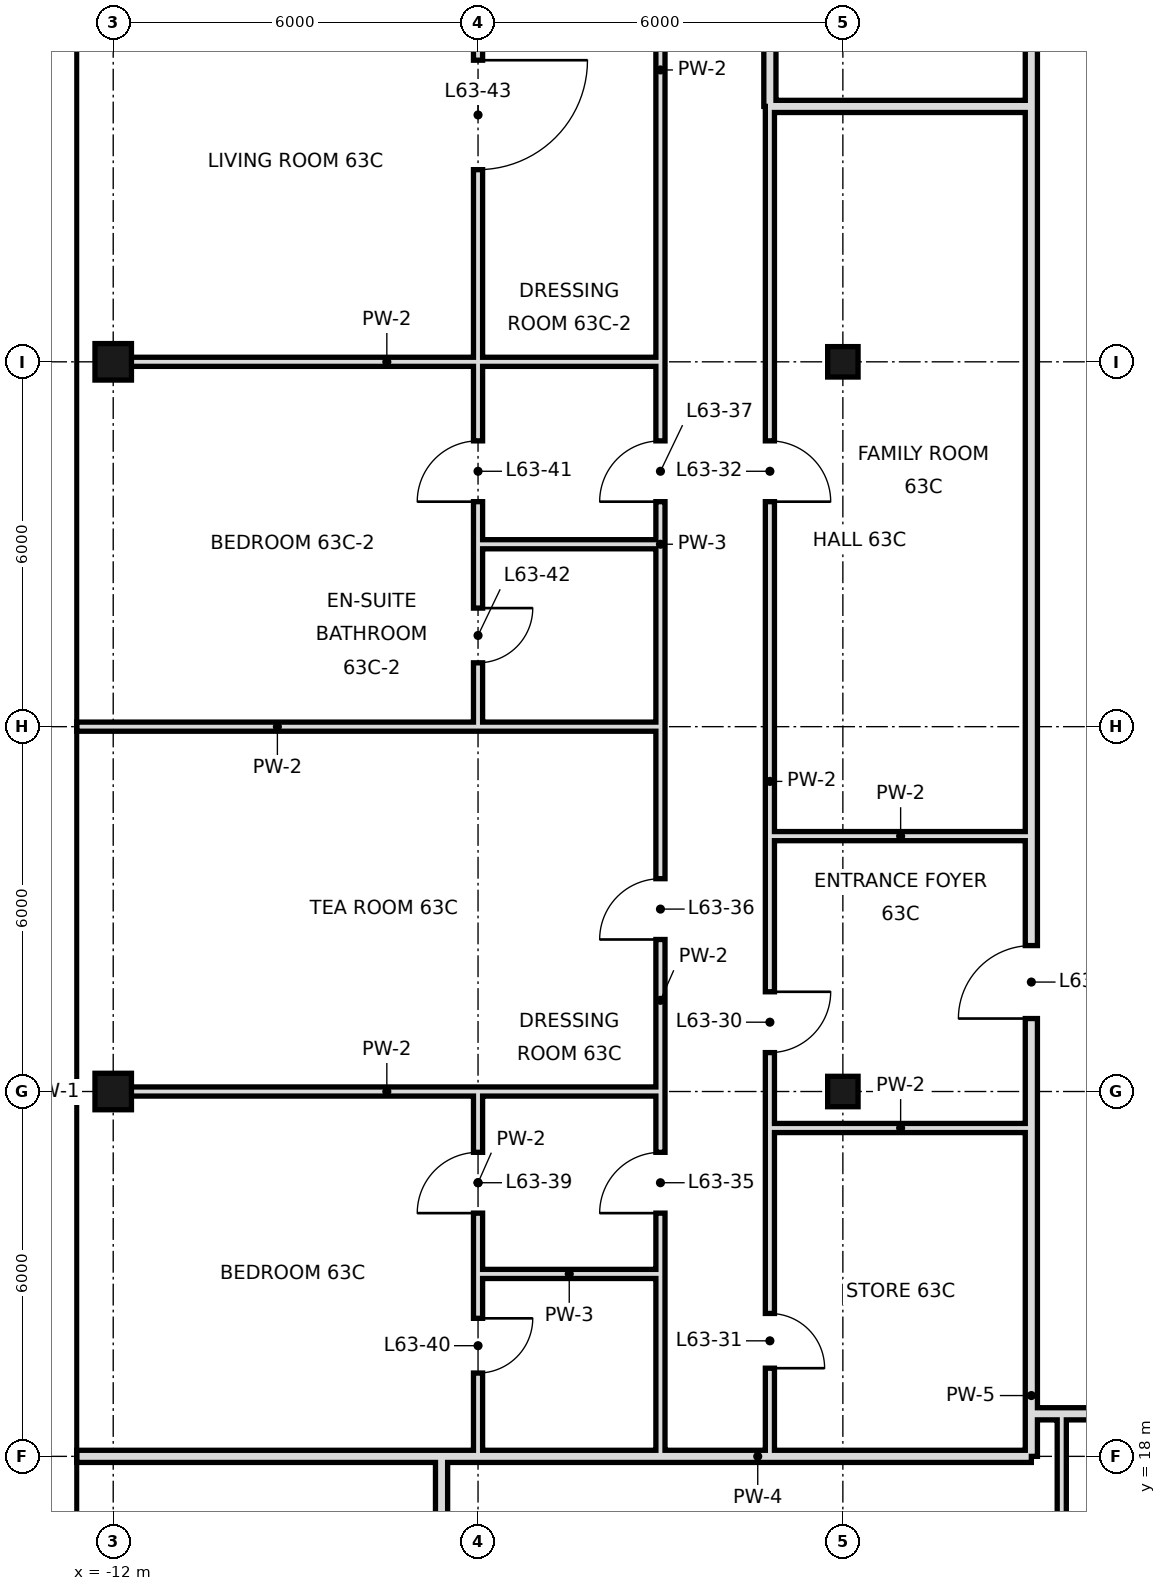
"""IFC4 building model, lengths in metres.
Left out: names, types, materials, properties, quantities, classifications, styles, units other than length and angle.
Written with IfcOpenShell. Run it as: python <this file> out.ifc"""

import sys

from ifc_helpers import new_model, si_unit, direction, frame, frame_2d, origin, origin_2d, place, context, subcontext, project, spatial, rectangle, hollow_rectangle, extrude, element, fill, save


model = new_model("IFC4")
c1 = context("Model", 3, precision=1e-05, world=origin(), true_north=direction((0.0, 1.0)))
c2 = subcontext(c1, "Body", "Model", "MODEL_VIEW")
j1 = project(units=[si_unit("LENGTHUNIT", "METRE"), si_unit("PLANEANGLEUNIT", "RADIAN")], contexts=[c1])
p1 = place(None, origin())
s1 = spatial("IfcSite", under=j1, at=p1, CompositionType="ELEMENT")
p2 = place(p1, origin())
s2 = spatial("IfcBuilding", under=s1, at=p2, CompositionType="ELEMENT")
p3 = place(p2, frame((0.0, 0.0, 266.6)))
s3 = spatial("IfcBuildingStorey", under=s2, at=p3, CompositionType="ELEMENT", Elevation=266.6)
for number, where, z_axis, x_axis in (
    (1, (-12.0, 24.0, 0.0), (0.0, 0.0, 1.0), (1.0, 0.0, 0.0)),
    (2, (-12.0, 36.0, 0.0), (0.0, 0.0, 1.0), (1.0, 0.0, 0.0)),
):
    element("IfcColumn", number, at=place(p3, frame(where, z_axis=z_axis, x_axis=x_axis)), inside=s3, PredefinedType="COLUMN", context=c2, shape_type="SweptSolid", body=[
        extrude(hollow_rectangle(XDim=0.6, YDim=0.6, WallThickness=0.028, at=origin_2d()), origin(), (0.0, 0.0, 1.0), 3.6),
    ])
for number, where, z_axis, x_axis in (
    (3, (0.0, 24.0, 0.0), (0.0, 0.0, 1.0), (1.0, 0.0, 0.0)),
    (4, (0.0, 36.0, 0.0), (0.0, 0.0, 1.0), (1.0, 0.0, 0.0)),
):
    element("IfcColumn", number, at=place(p3, frame(where, z_axis=z_axis, x_axis=x_axis)), inside=s3, PredefinedType="COLUMN", context=c2, shape_type="SweptSolid", body=[
        extrude(hollow_rectangle(XDim=0.5, YDim=0.5, WallThickness=0.025, at=origin_2d()), origin(), (0.0, 0.0, 1.0), 3.6),
    ])
p4 = place(p3, frame((-1.2, 40.2, 0.0), z_axis=(0.0, 0.0, 1.0), x_axis=(0.0, 1.0, 0.0)))
e5 = element("IfcWall", 5, at=p4, inside=s3, PredefinedType="SOLIDWALL", context=c2, shape_type="SweptSolid", body=[
    extrude(rectangle(XDim=5.4, YDim=0.2, at=frame_2d((2.7, 0.0))), origin(), (0.0, 0.0, 1.0), 2.72),
])
p5 = place(p4, frame((1.42, 0.0, 0.0)))
e6 = element("IfcOpeningElement", 6, at=p5, cuts=e5, PredefinedType="OPENING", context=c2, shape_type="SweptSolid", body=[
    extrude(rectangle(XDim=1.0, YDim=2.4, at=frame_2d((0.5, 1.2))), frame((0.0, 0.11, 0.0), z_axis=(0.0, -1.0, 0.0), x_axis=(1.0, 0.0, 0.0)), (0.0, 0.0, 1.0), 0.22),
])
p6 = place(p3, frame((-1.2, 18.0, 0.0), z_axis=(0.0, 0.0, 1.0), x_axis=(0.0, 1.0, 0.0)))
e7 = element("IfcWall", 7, at=p6, inside=s3, PredefinedType="PARTITIONING", context=c2, shape_type="SweptSolid", body=[
    extrude(rectangle(XDim=22.2, YDim=0.15, at=frame_2d((11.1, 0.0))), origin(), (0.0, 0.0, 1.0), 3.42),
])
p7 = place(p6, frame((6.64, 0.0, 0.0)))
e8 = element("IfcOpeningElement", 8, at=p7, cuts=e7, PredefinedType="OPENING", context=c2, shape_type="SweptSolid", body=[
    extrude(rectangle(XDim=1.0, YDim=2.4, at=frame_2d((0.5, 1.2))), frame((0.0, 0.085, 0.0), z_axis=(0.0, -1.0, 0.0), x_axis=(1.0, 0.0, 0.0)), (0.0, 0.0, 1.0), 0.17),
])
p8 = place(p6, frame((1.45, 0.0, 0.0)))
e9 = element("IfcOpeningElement", 9, at=p8, cuts=e7, PredefinedType="OPENING", context=c2, shape_type="SweptSolid", body=[
    extrude(rectangle(XDim=0.9, YDim=2.1, at=frame_2d((0.45, 1.05))), frame((0.0, 0.085, 0.0), z_axis=(0.0, -1.0, 0.0), x_axis=(1.0, 0.0, 0.0)), (0.0, 0.0, 1.0), 0.17),
])
p9 = place(p6, frame((15.7, 0.0, 0.0)))
e10 = element("IfcOpeningElement", 10, at=p9, cuts=e7, PredefinedType="OPENING", context=c2, shape_type="SweptSolid", body=[
    extrude(rectangle(XDim=1.0, YDim=2.4, at=frame_2d((0.5, 1.2))), frame((0.0, 0.085, 0.0), z_axis=(0.0, -1.0, 0.0), x_axis=(1.0, 0.0, 0.0)), (0.0, 0.0, 1.0), 0.17),
])
p10 = place(p3, frame((-3.0, 21.0, 0.0), z_axis=(0.0, 0.0, 1.0), x_axis=(0.0, 1.0, 0.0)))
e11 = element("IfcWall", 11, at=p10, inside=s3, PredefinedType="PARTITIONING", context=c2, shape_type="SweptSolid", body=[
    extrude(rectangle(XDim=9.0, YDim=0.15, at=frame_2d((4.5, 0.0))), origin(), (0.0, 0.0, 1.0), 3.42),
])
p11 = place(p10, frame((1.0, 0.0, 0.0)))
e12 = element("IfcOpeningElement", 12, at=p11, cuts=e11, PredefinedType="OPENING", context=c2, shape_type="SweptSolid", body=[
    extrude(rectangle(XDim=1.0, YDim=2.4, at=frame_2d((0.5, 1.2))), frame((0.0, 0.085, 0.0), z_axis=(0.0, -1.0, 0.0), x_axis=(1.0, 0.0, 0.0)), (0.0, 0.0, 1.0), 0.17),
])
p12 = place(p10, frame((5.5, 0.0, 0.0)))
e13 = element("IfcOpeningElement", 13, at=p12, cuts=e11, PredefinedType="OPENING", context=c2, shape_type="SweptSolid", body=[
    extrude(rectangle(XDim=1.0, YDim=2.4, at=frame_2d((0.5, 1.2))), frame((0.0, 0.085, 0.0), z_axis=(0.0, -1.0, 0.0), x_axis=(1.0, 0.0, 0.0)), (0.0, 0.0, 1.0), 0.17),
])
p13 = place(p3, frame((-3.0, 33.0, 0.0), z_axis=(0.0, 0.0, 1.0), x_axis=(0.0, 1.0, 0.0)))
e14 = element("IfcWall", 14, at=p13, inside=s3, PredefinedType="PARTITIONING", context=c2, shape_type="SweptSolid", body=[
    extrude(rectangle(XDim=15.6, YDim=0.15, at=frame_2d((7.8, 0.0))), origin(), (0.0, 0.0, 1.0), 3.42),
])
p14 = place(p13, frame((0.7, 0.0, 0.0)))
e15 = element("IfcOpeningElement", 15, at=p14, cuts=e14, PredefinedType="OPENING", context=c2, shape_type="SweptSolid", body=[
    extrude(rectangle(XDim=1.0, YDim=2.4, at=frame_2d((0.5, 1.2))), frame((0.0, 0.085, 0.0), z_axis=(0.0, -1.0, 0.0), x_axis=(1.0, 0.0, 0.0)), (0.0, 0.0, 1.0), 0.17),
])
p15 = place(p13, frame((10.04, 0.0, 0.0)))
e16 = element("IfcOpeningElement", 16, at=p15, cuts=e14, PredefinedType="OPENING", context=c2, shape_type="SweptSolid", body=[
    extrude(rectangle(XDim=1.8, YDim=2.4, at=frame_2d((0.9, 1.2))), frame((0.0, 0.085, 0.0), z_axis=(0.0, -1.0, 0.0), x_axis=(1.0, 0.0, 0.0)), (0.0, 0.0, 1.0), 0.17),
])
for number, where, z_axis, x_axis in (
    (17, (-3.0, 18.0, 0.0), (0.0, 0.0, 1.0), (0.0, 1.0, 0.0)),
    (18, (-3.0, 30.0, 0.0), (0.0, 0.0, 1.0), (0.0, 1.0, 0.0)),
):
    element("IfcWall", number, at=place(p3, frame(where, z_axis=z_axis, x_axis=x_axis)), inside=s3, PredefinedType="PARTITIONING", context=c2, shape_type="SweptSolid", body=[
        extrude(rectangle(XDim=3.0, YDim=0.15, at=frame_2d((1.5, 0.0))), origin(), (0.0, 0.0, 1.0), 3.42),
    ])
p16 = place(p3, frame((-6.0, 21.0, 0.0), z_axis=(0.0, 0.0, 1.0), x_axis=(0.0, 1.0, 0.0)))
e19 = element("IfcWall", 19, at=p16, inside=s3, PredefinedType="PARTITIONING", context=c2, shape_type="SweptSolid", body=[
    extrude(rectangle(XDim=3.0, YDim=0.15, at=frame_2d((1.5, 0.0))), origin(), (0.0, 0.0, 1.0), 3.42),
])
p17 = place(p16, frame((1.0, 0.0, 0.0)))
e20 = element("IfcOpeningElement", 20, at=p17, cuts=e19, PredefinedType="OPENING", context=c2, shape_type="SweptSolid", body=[
    extrude(rectangle(XDim=1.0, YDim=2.4, at=frame_2d((0.5, 1.2))), frame((0.0, 0.085, 0.0), z_axis=(0.0, -1.0, 0.0), x_axis=(1.0, 0.0, 0.0)), (0.0, 0.0, 1.0), 0.17),
])
p18 = place(p3, frame((-6.0, 33.0, 0.0), z_axis=(0.0, 0.0, 1.0), x_axis=(0.0, 1.0, 0.0)))
e21 = element("IfcWall", 21, at=p18, inside=s3, PredefinedType="PARTITIONING", context=c2, shape_type="SweptSolid", body=[
    extrude(rectangle(XDim=15.0, YDim=0.15, at=frame_2d((7.5, 0.0))), origin(), (0.0, 0.0, 1.0), 3.42),
])
p19 = place(p18, frame((0.7, 0.0, 0.0)))
e22 = element("IfcOpeningElement", 22, at=p19, cuts=e21, PredefinedType="OPENING", context=c2, shape_type="SweptSolid", body=[
    extrude(rectangle(XDim=1.0, YDim=2.4, at=frame_2d((0.5, 1.2))), frame((0.0, 0.085, 0.0), z_axis=(0.0, -1.0, 0.0), x_axis=(1.0, 0.0, 0.0)), (0.0, 0.0, 1.0), 0.17),
])
p20 = place(p18, frame((6.16, 0.0, 0.0)))
e23 = element("IfcOpeningElement", 23, at=p20, cuts=e21, PredefinedType="OPENING", context=c2, shape_type="SweptSolid", body=[
    extrude(rectangle(XDim=1.8, YDim=2.4, at=frame_2d((0.9, 1.2))), frame((0.0, 0.085, 0.0), z_axis=(0.0, -1.0, 0.0), x_axis=(1.0, 0.0, 0.0)), (0.0, 0.0, 1.0), 0.17),
])
p21 = place(p3, frame((-6.0, 18.0, 0.0), z_axis=(0.0, 0.0, 1.0), x_axis=(0.0, 1.0, 0.0)))
e24 = element("IfcWall", 24, at=p21, inside=s3, PredefinedType="PARTITIONING", context=c2, shape_type="SweptSolid", body=[
    extrude(rectangle(XDim=3.0, YDim=0.15, at=frame_2d((1.5, 0.0))), origin(), (0.0, 0.0, 1.0), 3.42),
])
p22 = place(p21, frame((1.37, 0.0, 0.0)))
e25 = element("IfcOpeningElement", 25, at=p22, cuts=e24, PredefinedType="OPENING", context=c2, shape_type="SweptSolid", body=[
    extrude(rectangle(XDim=0.9, YDim=2.4, at=frame_2d((0.45, 1.2))), frame((0.0, 0.085, 0.0), z_axis=(0.0, -1.0, 0.0), x_axis=(1.0, 0.0, 0.0)), (0.0, 0.0, 1.0), 0.17),
])
p23 = place(p3, frame((-6.0, 30.0, 0.0), z_axis=(0.0, 0.0, 1.0), x_axis=(0.0, 1.0, 0.0)))
e26 = element("IfcWall", 26, at=p23, inside=s3, PredefinedType="PARTITIONING", context=c2, shape_type="SweptSolid", body=[
    extrude(rectangle(XDim=3.0, YDim=0.15, at=frame_2d((1.5, 0.0))), origin(), (0.0, 0.0, 1.0), 3.42),
])
p24 = place(p23, frame((1.05, 0.0, 0.0)))
e27 = element("IfcOpeningElement", 27, at=p24, cuts=e26, PredefinedType="OPENING", context=c2, shape_type="SweptSolid", body=[
    extrude(rectangle(XDim=0.9, YDim=2.4, at=frame_2d((0.45, 1.2))), frame((0.0, 0.085, 0.0), z_axis=(0.0, -1.0, 0.0), x_axis=(1.0, 0.0, 0.0)), (0.0, 0.0, 1.0), 0.17),
])
p25 = place(p3, frame((-6.6, 10.8, 0.0), z_axis=(0.0, 0.0, 1.0), x_axis=(0.0, 1.0, 0.0)))
e28 = element("IfcWall", 28, at=p25, inside=s3, PredefinedType="SOLIDWALL", context=c2, shape_type="SweptSolid", body=[
    extrude(rectangle(XDim=7.2, YDim=0.2, at=frame_2d((3.6, 0.0))), origin(), (0.0, 0.0, 1.0), 2.72),
])
p26 = place(p3, frame((3.1, 18.7, 0.0), z_axis=(0.0, 0.0, 1.0), x_axis=(0.0, 1.0, 0.0)))
e29 = element("IfcWall", 29, at=p26, inside=s3, PredefinedType="SOLIDWALL", context=c2, shape_type="SweptSolid", body=[
    extrude(rectangle(XDim=21.5, YDim=0.2, at=frame_2d((10.75, 0.0))), origin(), (0.0, 0.0, 1.0), 2.97),
])
p27 = place(p26, frame((6.5, 0.0, 0.0)))
e30 = element("IfcOpeningElement", 30, at=p27, cuts=e29, PredefinedType="OPENING", context=c2, shape_type="SweptSolid", body=[
    extrude(rectangle(XDim=1.2, YDim=2.4, at=frame_2d((0.6, 1.2))), frame((0.0, 0.11, 0.0), z_axis=(0.0, -1.0, 0.0), x_axis=(1.0, 0.0, 0.0)), (0.0, 0.0, 1.0), 0.22),
])
p28 = place(p3, frame((3.1, 40.2, 0.0), z_axis=(0.0, 0.0, 1.0), x_axis=(0.0, 1.0, 0.0)))
e31 = element("IfcWall", 31, at=p28, inside=s3, PredefinedType="SOLIDWALL", context=c2, shape_type="SweptSolid", body=[
    extrude(rectangle(XDim=5.4, YDim=0.2, at=frame_2d((2.7, 0.0))), origin(), (0.0, 0.0, 1.0), 2.97),
])
p29 = place(p3, frame((3.1, 18.0, 0.0), z_axis=(0.0, 0.0, 1.0), x_axis=(0.0, 1.0, 0.0)))
e32 = element("IfcWall", 32, at=p29, inside=s3, PredefinedType="SOLIDWALL", context=c2, shape_type="SweptSolid", body=[
    extrude(rectangle(XDim=0.7, YDim=0.2, at=frame_2d((0.35, 0.0))), origin(), (0.0, 0.0, 1.0), 2.97),
])
p30 = place(p3, frame((3.6, 10.8, 0.0), z_axis=(0.0, 0.0, 1.0), x_axis=(0.0, 1.0, 0.0)))
e33 = element("IfcWall", 33, at=p30, inside=s3, PredefinedType="PARTITIONING", context=c2, shape_type="SweptSolid", body=[
    extrude(rectangle(XDim=7.9, YDim=0.15, at=frame_2d((3.95, 0.0))), origin(), (0.0, 0.0, 1.0), 3.42),
])
p31 = place(p3, frame((-12.6, 18.0, 0.0), z_axis=(0.0, 0.0, 1.0), x_axis=(1.0, 0.0, 0.0)))
e34 = element("IfcWall", 34, at=p31, inside=s3, PredefinedType="SOLIDWALL", context=c2, shape_type="SweptSolid", body=[
    extrude(rectangle(XDim=6.0, YDim=0.2, at=frame_2d((3.0, 0.0))), origin(), (0.0, 0.0, 1.0), 2.72),
])
p32 = place(p3, frame((-6.6, 18.0, 0.0), z_axis=(0.0, 0.0, 1.0), x_axis=(1.0, 0.0, 0.0)))
e35 = element("IfcWall", 35, at=p32, inside=s3, PredefinedType="SOLIDWALL", context=c2, shape_type="SweptSolid", body=[
    extrude(rectangle(XDim=9.7, YDim=0.2, at=frame_2d((4.85, 0.0))), origin(), (0.0, 0.0, 1.0), 2.72),
])
p33 = place(p3, frame((3.1, 18.7, 0.0), z_axis=(0.0, 0.0, 1.0), x_axis=(1.0, 0.0, 0.0)))
e36 = element("IfcWall", 36, at=p33, inside=s3, PredefinedType="SOLIDWALL", context=c2, shape_type="SweptSolid", body=[
    extrude(rectangle(XDim=20.9, YDim=0.2, at=frame_2d((10.45, 0.0))), origin(), (0.0, 0.0, 1.0), 2.72),
])
p34 = place(p33, frame((14.9, 0.0, 0.0)))
e37 = element("IfcOpeningElement", 37, at=p34, cuts=e36, PredefinedType="OPENING", context=c2, shape_type="SweptSolid", body=[
    extrude(rectangle(XDim=1.2, YDim=2.4, at=frame_2d((0.6, 1.2))), frame((0.0, 0.11, 0.0), z_axis=(0.0, -1.0, 0.0), x_axis=(1.0, 0.0, 0.0)), (0.0, 0.0, 1.0), 0.22),
])
p35 = place(p3, frame((-6.0, 21.0, 0.0), z_axis=(0.0, 0.0, 1.0), x_axis=(1.0, 0.0, 0.0)))
e38 = element("IfcWall", 38, at=p35, inside=s3, PredefinedType="PARTITIONING", context=c2, shape_type="SweptSolid", body=[
    extrude(rectangle(XDim=3.0, YDim=0.15, at=frame_2d((1.5, 0.0))), origin(), (0.0, 0.0, 1.0), 3.42),
])
p36 = place(p3, frame((-1.2, 23.4, 0.0), z_axis=(0.0, 0.0, 1.0), x_axis=(1.0, 0.0, 0.0)))
e39 = element("IfcWall", 39, at=p36, inside=s3, PredefinedType="PARTITIONING", context=c2, shape_type="SweptSolid", body=[
    extrude(rectangle(XDim=4.3, YDim=0.15, at=frame_2d((2.15, 0.0))), origin(), (0.0, 0.0, 1.0), 3.42),
])
p37 = place(p3, frame((-12.0, 24.0, 0.0), z_axis=(0.0, 0.0, 1.0), x_axis=(1.0, 0.0, 0.0)))
e40 = element("IfcWall", 40, at=p37, inside=s3, PredefinedType="PARTITIONING", context=c2, shape_type="SweptSolid", body=[
    extrude(rectangle(XDim=9.0, YDim=0.15, at=frame_2d((4.5, 0.0))), origin(), (0.0, 0.0, 1.0), 2.72),
])
p38 = place(p3, frame((-1.2, 28.2, 0.0), z_axis=(0.0, 0.0, 1.0), x_axis=(1.0, 0.0, 0.0)))
e41 = element("IfcWall", 41, at=p38, inside=s3, PredefinedType="PARTITIONING", context=c2, shape_type="SweptSolid", body=[
    extrude(rectangle(XDim=4.3, YDim=0.15, at=frame_2d((2.15, 0.0))), origin(), (0.0, 0.0, 1.0), 3.42),
])
p39 = place(p3, frame((-12.6, 30.0, 0.0), z_axis=(0.0, 0.0, 1.0), x_axis=(1.0, 0.0, 0.0)))
e42 = element("IfcWall", 42, at=p39, inside=s3, PredefinedType="PARTITIONING", context=c2, shape_type="SweptSolid", body=[
    extrude(rectangle(XDim=6.6, YDim=0.15, at=frame_2d((3.3, 0.0))), origin(), (0.0, 0.0, 1.0), 2.72),
])
p40 = place(p3, frame((-6.0, 30.0, 0.0), z_axis=(0.0, 0.0, 1.0), x_axis=(1.0, 0.0, 0.0)))
e43 = element("IfcWall", 43, at=p40, inside=s3, PredefinedType="PARTITIONING", context=c2, shape_type="SweptSolid", body=[
    extrude(rectangle(XDim=3.0, YDim=0.15, at=frame_2d((1.5, 0.0))), origin(), (0.0, 0.0, 1.0), 2.72),
])
p41 = place(p3, frame((-6.0, 33.0, 0.0), z_axis=(0.0, 0.0, 1.0), x_axis=(1.0, 0.0, 0.0)))
e44 = element("IfcWall", 44, at=p41, inside=s3, PredefinedType="PARTITIONING", context=c2, shape_type="SweptSolid", body=[
    extrude(rectangle(XDim=3.0, YDim=0.15, at=frame_2d((1.5, 0.0))), origin(), (0.0, 0.0, 1.0), 3.42),
])
p42 = place(p3, frame((-12.0, 36.0, 0.0), z_axis=(0.0, 0.0, 1.0), x_axis=(1.0, 0.0, 0.0)))
e45 = element("IfcWall", 45, at=p42, inside=s3, PredefinedType="PARTITIONING", context=c2, shape_type="SweptSolid", body=[
    extrude(rectangle(XDim=9.0, YDim=0.15, at=frame_2d((4.5, 0.0))), origin(), (0.0, 0.0, 1.0), 2.72),
])
p43 = place(p3, frame((-1.2, 40.2, 0.0), z_axis=(0.0, 0.0, 1.0), x_axis=(1.0, 0.0, 0.0)))
e46 = element("IfcWall", 46, at=p43, inside=s3, PredefinedType="SOLIDWALL", context=c2, shape_type="SweptSolid", body=[
    extrude(rectangle(XDim=4.3, YDim=0.2, at=frame_2d((2.15, 0.0))), origin(), (0.0, 0.0, 1.0), 2.72),
])
p44 = place(p7, origin())
e47 = element("IfcDoor", 47, at=p44, inside=s3, OperationType="SINGLE_SWING_RIGHT", PredefinedType="DOOR", context=c2, shape_type="SweptSolid", body=[
    extrude(rectangle(XDim=1.0, YDim=2.4, at=frame_2d((0.5, 1.2))), frame((0.0, 0.025, 0.0), z_axis=(0.0, -1.0, 0.0), x_axis=(1.0, 0.0, 0.0)), (0.0, 0.0, 1.0), 0.05),
])
fill(e8, e47)
p45 = place(p8, frame((0.9, 0.0, 0.0), z_axis=(0.0, 0.0, 1.0), x_axis=(-1.0, 0.0, 0.0)))
e48 = element("IfcDoor", 48, at=p45, inside=s3, OperationType="SINGLE_SWING_RIGHT", PredefinedType="DOOR", context=c2, shape_type="SweptSolid", body=[
    extrude(rectangle(XDim=0.9, YDim=2.1, at=frame_2d((0.45, 1.05))), frame((0.0, 0.025, 0.0), z_axis=(0.0, -1.0, 0.0), x_axis=(1.0, 0.0, 0.0)), (0.0, 0.0, 1.0), 0.05),
])
fill(e9, e48)
p46 = place(p9, frame((1.0, 0.0, 0.0), z_axis=(0.0, 0.0, 1.0), x_axis=(-1.0, 0.0, 0.0)))
e49 = element("IfcDoor", 49, at=p46, inside=s3, OperationType="SINGLE_SWING_RIGHT", PredefinedType="DOOR", context=c2, shape_type="SweptSolid", body=[
    extrude(rectangle(XDim=1.0, YDim=2.4, at=frame_2d((0.5, 1.2))), frame((0.0, 0.025, 0.0), z_axis=(0.0, -1.0, 0.0), x_axis=(1.0, 0.0, 0.0)), (0.0, 0.0, 1.0), 0.05),
])
fill(e10, e49)
p47 = place(p11, origin())
e50 = element("IfcDoor", 50, at=p47, inside=s3, OperationType="SINGLE_SWING_LEFT", PredefinedType="DOOR", context=c2, shape_type="SweptSolid", body=[
    extrude(rectangle(XDim=1.0, YDim=2.4, at=frame_2d((0.5, 1.2))), frame((0.0, 0.025, 0.0), z_axis=(0.0, -1.0, 0.0), x_axis=(1.0, 0.0, 0.0)), (0.0, 0.0, 1.0), 0.05),
])
fill(e12, e50)
p48 = place(p12, origin())
e51 = element("IfcDoor", 51, at=p48, inside=s3, OperationType="SINGLE_SWING_LEFT", PredefinedType="DOOR", context=c2, shape_type="SweptSolid", body=[
    extrude(rectangle(XDim=1.0, YDim=2.4, at=frame_2d((0.5, 1.2))), frame((0.0, 0.025, 0.0), z_axis=(0.0, -1.0, 0.0), x_axis=(1.0, 0.0, 0.0)), (0.0, 0.0, 1.0), 0.05),
])
fill(e13, e51)
p49 = place(p14, origin())
e52 = element("IfcDoor", 52, at=p49, inside=s3, OperationType="SINGLE_SWING_LEFT", PredefinedType="DOOR", context=c2, shape_type="SweptSolid", body=[
    extrude(rectangle(XDim=1.0, YDim=2.4, at=frame_2d((0.5, 1.2))), frame((0.0, 0.025, 0.0), z_axis=(0.0, -1.0, 0.0), x_axis=(1.0, 0.0, 0.0)), (0.0, 0.0, 1.0), 0.05),
])
fill(e15, e52)
p50 = place(p17, origin())
e53 = element("IfcDoor", 53, at=p50, inside=s3, OperationType="SINGLE_SWING_LEFT", PredefinedType="DOOR", context=c2, shape_type="SweptSolid", body=[
    extrude(rectangle(XDim=1.0, YDim=2.4, at=frame_2d((0.5, 1.2))), frame((0.0, 0.025, 0.0), z_axis=(0.0, -1.0, 0.0), x_axis=(1.0, 0.0, 0.0)), (0.0, 0.0, 1.0), 0.05),
])
fill(e20, e53)
p51 = place(p22, origin())
e54 = element("IfcDoor", 54, at=p51, inside=s3, OperationType="SINGLE_SWING_RIGHT", PredefinedType="DOOR", context=c2, shape_type="SweptSolid", body=[
    extrude(rectangle(XDim=0.9, YDim=2.4, at=frame_2d((0.45, 1.2))), frame((0.0, 0.025, 0.0), z_axis=(0.0, -1.0, 0.0), x_axis=(1.0, 0.0, 0.0)), (0.0, 0.0, 1.0), 0.05),
])
fill(e25, e54)
p52 = place(p19, origin())
e55 = element("IfcDoor", 55, at=p52, inside=s3, OperationType="SINGLE_SWING_LEFT", PredefinedType="DOOR", context=c2, shape_type="SweptSolid", body=[
    extrude(rectangle(XDim=1.0, YDim=2.4, at=frame_2d((0.5, 1.2))), frame((0.0, 0.025, 0.0), z_axis=(0.0, -1.0, 0.0), x_axis=(1.0, 0.0, 0.0)), (0.0, 0.0, 1.0), 0.05),
])
fill(e22, e55)
p53 = place(p24, origin())
e56 = element("IfcDoor", 56, at=p53, inside=s3, OperationType="SINGLE_SWING_RIGHT", PredefinedType="DOOR", context=c2, shape_type="SweptSolid", body=[
    extrude(rectangle(XDim=0.9, YDim=2.4, at=frame_2d((0.45, 1.2))), frame((0.0, 0.025, 0.0), z_axis=(0.0, -1.0, 0.0), x_axis=(1.0, 0.0, 0.0)), (0.0, 0.0, 1.0), 0.05),
])
fill(e27, e56)
p54 = place(p20, origin())
e57 = element("IfcDoor", 57, at=p54, inside=s3, OperationType="SINGLE_SWING_RIGHT", PredefinedType="DOOR", context=c2, shape_type="SweptSolid", body=[
    extrude(rectangle(XDim=1.8, YDim=2.4, at=frame_2d((0.9, 1.2))), frame((0.0, 0.025, 0.0), z_axis=(0.0, -1.0, 0.0), x_axis=(1.0, 0.0, 0.0)), (0.0, 0.0, 1.0), 0.05),
])
fill(e23, e57)
p55 = place(p27, origin())
e58 = element("IfcDoor", 58, at=p55, inside=s3, OperationType="SINGLE_SWING_LEFT", PredefinedType="DOOR", context=c2, shape_type="SweptSolid", body=[
    extrude(rectangle(XDim=1.2, YDim=2.4, at=frame_2d((0.6, 1.2))), frame((0.0, 0.025, 0.0), z_axis=(0.0, -1.0, 0.0), x_axis=(1.0, 0.0, 0.0)), (0.0, 0.0, 1.0), 0.05),
])
fill(e30, e58)
save(model, sys.argv[1])
